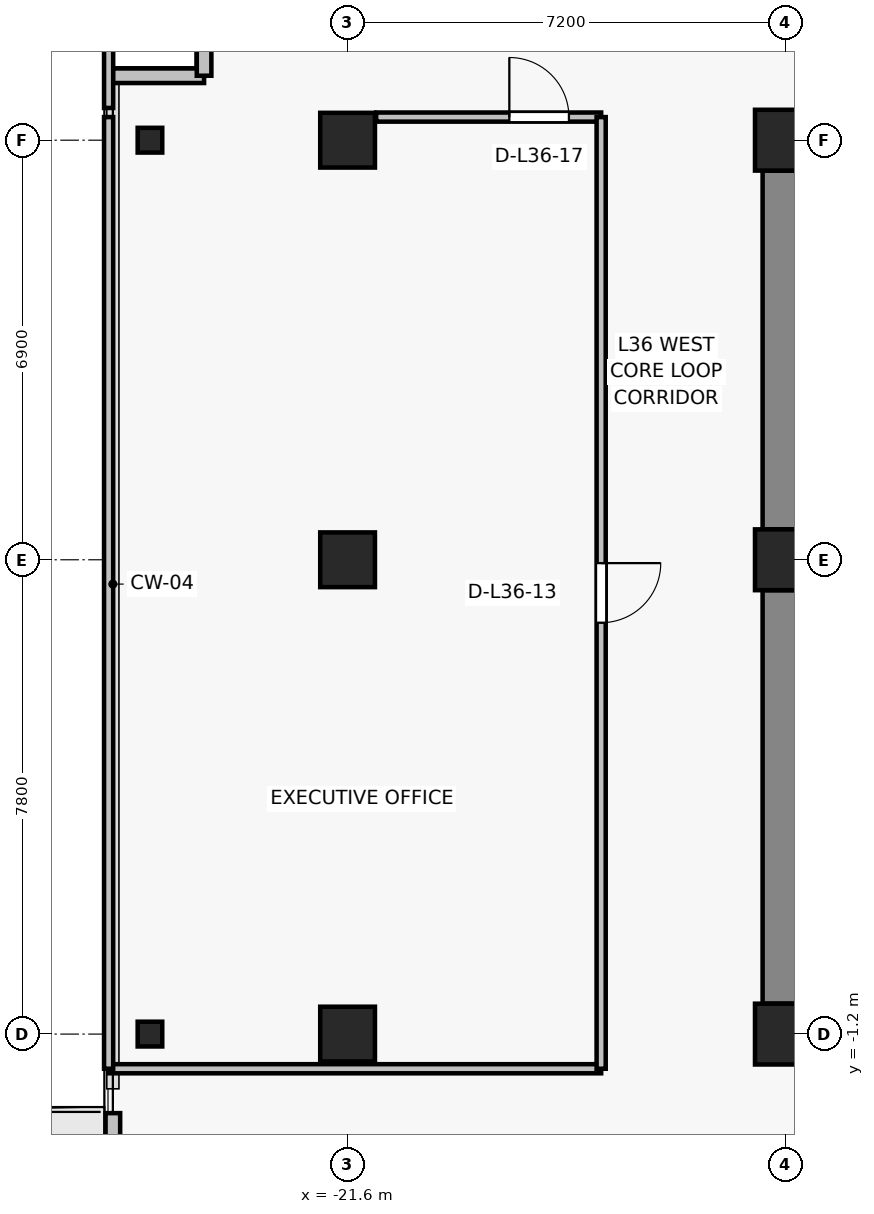
"""IFC4 building model, lengths in metres.
Left out: names, types, materials, properties, quantities, classifications, styles, units other than length and angle.
Written with IfcOpenShell. Run it as: python <this file> out.ifc"""

import sys

from ifc_helpers import new_model, si_unit, direction, frame, frame_2d, origin, origin_2d, place, context, subcontext, project, spatial, rectangle, i_section, extrude, source, transform, mapped, element, fill, save


model = new_model("IFC4")
c1 = context("Model", 3, precision=1e-05, world=origin(), true_north=direction((0.0, 1.0)))
c2 = subcontext(c1, "Body", "Model", "MODEL_VIEW")
j1 = project(units=[si_unit("LENGTHUNIT", "METRE"), si_unit("PLANEANGLEUNIT", "RADIAN")], contexts=[c1])
p1 = place(None, origin())
s1 = spatial("IfcSite", under=j1, at=p1, CompositionType="ELEMENT")
p2 = place(p1, origin())
s2 = spatial("IfcBuilding", under=s1, at=p2, CompositionType="ELEMENT")
p3 = place(p2, frame((0.0, 0.0, 129.7)))
s3 = spatial("IfcBuildingStorey", under=s2, at=p3, CompositionType="ELEMENT", Elevation=129.7)
for number, where, z_axis, x_axis in (
    (1, (-14.4, -1.2, 0.0), (0.0, 0.0, 1.0), (1.0, 0.0, 0.0)),
    (2, (-14.4, 6.6, 0.0), (0.0, 0.0, 1.0), (1.0, 0.0, 0.0)),
    (3, (-14.4, 13.5, 0.0), (0.0, 0.0, 1.0), (1.0, 0.0, 0.0)),
):
    element("IfcColumn", number, at=place(p3, frame(where, z_axis=z_axis, x_axis=x_axis)), inside=s3, PredefinedType="COLUMN", context=c2, shape_type="SweptSolid", body=[
        extrude(rectangle(XDim=1.0, YDim=1.0, at=origin_2d()), origin(), (0.0, 0.0, 1.0), 3.3),
    ])
for number, where, z_axis, x_axis in (
    (4, (-21.6, -1.2, 0.0), (0.0, 0.0, 1.0), (1.0, 0.0, 0.0)),
    (5, (-21.6, 6.6, 0.0), (0.0, 0.0, 1.0), (1.0, 0.0, 0.0)),
    (6, (-21.6, 13.5, 0.0), (0.0, 0.0, 1.0), (1.0, 0.0, 0.0)),
):
    element("IfcColumn", number, at=place(p3, frame(where, z_axis=z_axis, x_axis=x_axis)), inside=s3, PredefinedType="COLUMN", context=c2, shape_type="SweptSolid", body=[
        extrude(rectangle(XDim=0.9, YDim=0.9, at=origin_2d()), origin(), (0.0, 0.0, 1.0), 3.3),
    ])
for number, where, z_axis, x_axis in (
    (7, (-24.85, -1.2, 0.0), (0.0, 0.0, 1.0), (1.0, 0.0, 0.0)),
    (8, (-24.85, 13.5, 0.0), (0.0, 0.0, 1.0), (1.0, 0.0, 0.0)),
):
    element("IfcColumn", number, at=place(p3, frame(where, z_axis=z_axis, x_axis=x_axis)), inside=s3, PredefinedType="COLUMN", context=c2, shape_type="SweptSolid", body=[
        extrude(i_section(OverallWidth=0.404, OverallDepth=0.407, WebThickness=0.022, FlangeThickness=0.032, FilletRadius=0.015, at=origin_2d()), origin(), (0.0, 0.0, 1.0), 3.3),
    ])
p4 = place(p3, frame((-14.4, -0.7, 0.0), z_axis=(0.0, 0.0, 1.0), x_axis=(0.0, 1.0, 0.0)))
e9 = element("IfcWall", 9, at=p4, inside=s3, PredefinedType="SHEAR", context=c2, shape_type="SweptSolid", body=[
    extrude(rectangle(XDim=6.8, YDim=0.75, at=frame_2d((3.4, 0.0))), origin(), (0.0, 0.0, 1.0), 3.075),
])
p5 = place(p3, frame((-14.4, 7.1, 0.0), z_axis=(0.0, 0.0, 1.0), x_axis=(0.0, 1.0, 0.0)))
e10 = element("IfcWall", 10, at=p5, inside=s3, PredefinedType="SHEAR", context=c2, shape_type="SweptSolid", body=[
    extrude(rectangle(XDim=5.9, YDim=0.75, at=frame_2d((2.95, 0.0))), origin(), (0.0, 0.0, 1.0), 3.075),
])
p6 = place(p3, frame((-25.46, -8.3, 0.0), z_axis=(0.0, 0.0, 1.0), x_axis=(0.0, 1.0, 0.0)))
e11 = element("IfcWall", 11, at=p6, inside=s3, PredefinedType="SOLIDWALL", context=c2, shape_type="SweptSolid", body=[
    extrude(rectangle(XDim=5.8, YDim=0.24, at=frame_2d((2.9, 0.0))), origin(), (0.0, 0.0, 1.0), 3.075),
])
p7 = place(p6, frame((0.696, 0.0, 0.0)))
e12 = element("IfcOpeningElement", 12, at=p7, cuts=e11, PredefinedType="OPENING", context=c2, shape_type="SweptSolid", body=[
    extrude(rectangle(XDim=1.0, YDim=2.2, at=frame_2d((0.5, 1.1))), frame((0.0, 0.13, 0.0), z_axis=(0.0, -1.0, 0.0), x_axis=(1.0, 0.0, 0.0)), (0.0, 0.0, 1.0), 0.26),
])
p8 = place(p6, frame((2.046, 0.0, 0.85)))
e13 = element("IfcOpeningElement", 13, at=p8, cuts=e11, PredefinedType="OPENING", context=c2, shape_type="SweptSolid", body=[
    extrude(rectangle(XDim=1.5, YDim=1.6, at=frame_2d((0.75, 0.8))), frame((0.0, 0.13, 0.0), z_axis=(0.0, -1.0, 0.0), x_axis=(1.0, 0.0, 0.0)), (0.0, 0.0, 1.0), 0.26),
])
for number, where, z_axis, x_axis in (
    (14, (-23.96, 14.56, 0.0), (0.0, 0.0, 1.0), (-1.0, 0.0, 0.0)),
    (15, (-23.96, 16.06, 0.0), (0.0, 0.0, 1.0), (0.0, -1.0, 0.0)),
):
    element("IfcWall", number, at=place(p3, frame(where, z_axis=z_axis, x_axis=x_axis)), inside=s3, PredefinedType="SOLIDWALL", context=c2, shape_type="SweptSolid", body=[
        extrude(rectangle(XDim=1.5, YDim=0.24, at=frame_2d((0.75, 0.0))), origin(), (0.0, 0.0, 1.0), 3.075),
    ])
p9 = place(p3, frame((-17.43, -1.77, 0.0), z_axis=(0.0, 0.0, 1.0), x_axis=(-1.0, 0.0, 0.0)))
e16 = element("IfcWall", 16, at=p9, inside=s3, PredefinedType="PARTITIONING", context=c2, shape_type="SweptSolid", body=[
    extrude(rectangle(XDim=8.1, YDim=0.15, at=frame_2d((4.05, 0.0))), origin(), (0.0, 0.0, 1.0), 2.515),
])
p10 = place(p3, frame((-21.13, 13.88, 0.0), z_axis=(0.0, 0.0, 1.0), x_axis=(1.0, 0.0, 0.0)))
e17 = element("IfcWall", 17, at=p10, inside=s3, PredefinedType="PARTITIONING", context=c2, shape_type="SweptSolid", body=[
    extrude(rectangle(XDim=3.7, YDim=0.15, at=frame_2d((1.85, 0.0))), origin(), (0.0, 0.0, 1.0), 3.075),
])
p11 = place(p10, frame((2.19, 0.0, 0.0)))
e18 = element("IfcOpeningElement", 18, at=p11, cuts=e17, PredefinedType="OPENING", context=c2, shape_type="SweptSolid", body=[
    extrude(rectangle(XDim=0.98, YDim=2.15, at=frame_2d((0.49, 1.075))), frame((0.0, 0.085, 0.0), z_axis=(0.0, -1.0, 0.0), x_axis=(1.0, 0.0, 0.0)), (0.0, 0.0, 1.0), 0.17),
])
p12 = place(p3, frame((-25.53, -1.77, 0.0), z_axis=(0.0, 0.0, 1.0), x_axis=(0.0, 1.0, 0.0)))
e19 = element("IfcWall", 19, at=p12, inside=s3, PredefinedType="PARTITIONING", context=c2, shape_type="SweptSolid", body=[
    extrude(rectangle(XDim=15.65, YDim=0.15, at=frame_2d((7.825, 0.0))), origin(), (0.0, 0.0, 1.0), 3.075),
])
p13 = place(p3, frame((-17.43, 13.88, 0.0), z_axis=(0.0, 0.0, 1.0), x_axis=(0.0, -1.0, 0.0)))
e20 = element("IfcWall", 20, at=p13, inside=s3, PredefinedType="PARTITIONING", context=c2, shape_type="SweptSolid", body=[
    extrude(rectangle(XDim=15.65, YDim=0.15, at=frame_2d((7.825, 0.0))), origin(), (0.0, 0.0, 1.0), 2.515),
])
p14 = place(p13, frame((7.335, 0.0, 0.0)))
e21 = element("IfcOpeningElement", 21, at=p14, cuts=e20, PredefinedType="OPENING", context=c2, shape_type="SweptSolid", body=[
    extrude(rectangle(XDim=0.98, YDim=2.15, at=frame_2d((0.49, 1.075))), frame((0.0, 0.085, 0.0), z_axis=(0.0, -1.0, 0.0), x_axis=(1.0, 0.0, 0.0)), (0.0, 0.0, 1.0), 0.17),
])
p15 = place(p3, frame((-25.53, 14.03, 0.0), z_axis=(0.0, 0.0, 1.0), x_axis=(0.0, 1.0, 0.0)))
e22 = element("IfcWall", 22, at=p15, inside=s3, PredefinedType="PARTITIONING", context=c2, shape_type="SweptSolid", body=[
    extrude(rectangle(XDim=3.6, YDim=0.15, at=frame_2d((1.8, 0.0))), origin(), (0.0, 0.0, 1.0), 3.075),
])
m1 = source(origin(), c2, "Body", "SweptSolid", [
    extrude(rectangle(XDim=0.98, YDim=2.15, at=frame_2d((0.49, 1.075))), frame((0.0, 0.025, 0.0), z_axis=(0.0, -1.0, 0.0), x_axis=(1.0, 0.0, 0.0)), (0.0, 0.0, 1.0), 0.05),
])
p16 = place(p14, origin())
e23 = element("IfcDoor", 23, at=p16, inside=s3, OperationType="SINGLE_SWING_LEFT", PredefinedType="DOOR", context=c2, shape_type="MappedRepresentation", body=[
    mapped(m1, transform((0.0, 0.0, 0.0), x_axis=(1.0, 0.0, 0.0), y_axis=(0.0, 1.0, 0.0), z_axis=(0.0, 0.0, 1.0), scale=1.0)),
])
fill(e21, e23)
p17 = place(p11, origin())
e24 = element("IfcDoor", 24, at=p17, inside=s3, OperationType="SINGLE_SWING_LEFT", PredefinedType="DOOR", context=c2, shape_type="MappedRepresentation", body=[
    mapped(m1, transform((0.0, 0.0, 0.0), x_axis=(1.0, 0.0, 0.0), y_axis=(0.0, 1.0, 0.0), z_axis=(0.0, 0.0, 1.0), scale=1.0)),
])
fill(e18, e24)
save(model, sys.argv[1])
